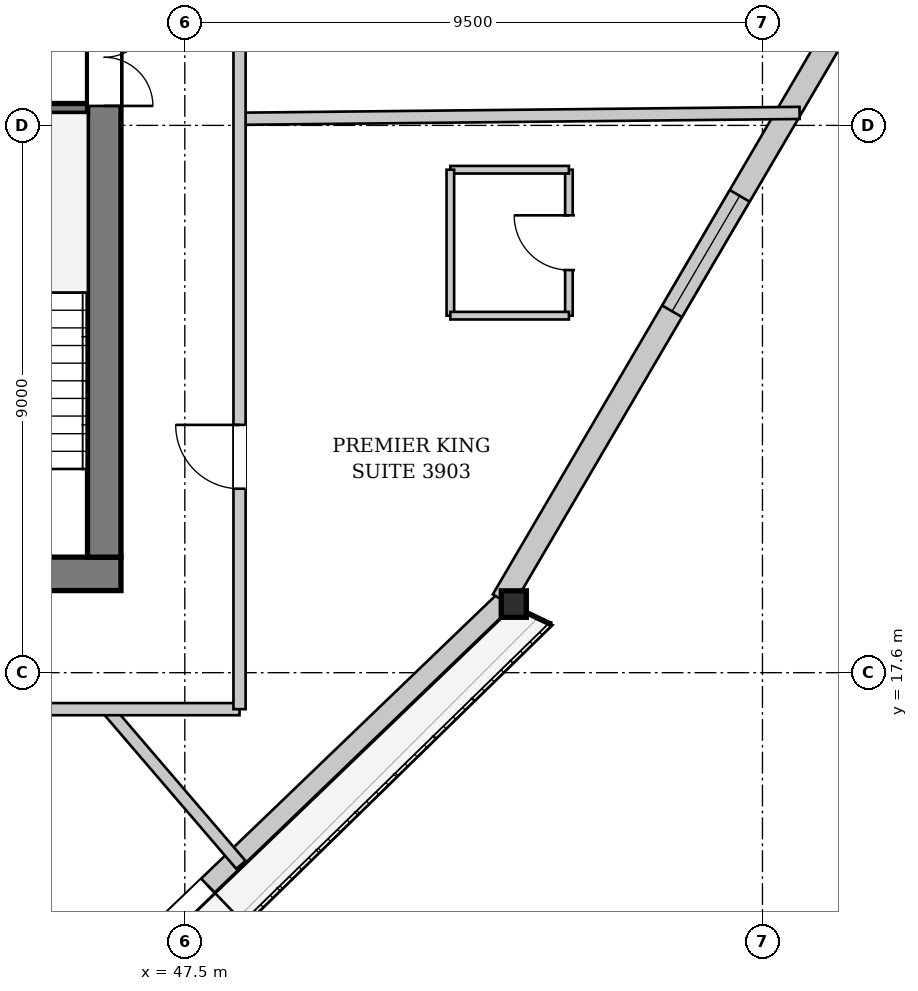
"""IFC4 building model, lengths in metres.
Left out: names, types, materials, properties, quantities, classifications, styles, units other than length and angle.
Written with IfcOpenShell. Run it as: python <this file> out.ifc"""

import sys

from ifc_helpers import new_model, si_unit, direction, frame, frame_2d, origin, origin_2d, place, context, subcontext, project, spatial, rectangle, i_section, extrude, source, transform, mapped, element, fill, save


model = new_model("IFC4")
c1 = context("Model", 3, precision=1e-05, world=origin(), true_north=direction((0.0, 1.0)))
c2 = subcontext(c1, "Body", "Model", "MODEL_VIEW")
j1 = project(units=[si_unit("LENGTHUNIT", "METRE"), si_unit("PLANEANGLEUNIT", "RADIAN")], contexts=[c1])
p1 = place(None, origin())
s1 = spatial("IfcSite", under=j1, at=p1, CompositionType="ELEMENT")
p2 = place(p1, origin())
s2 = spatial("IfcBuilding", under=s1, at=p2, CompositionType="ELEMENT")
p3 = place(p2, frame((0.0, 0.0, 150.15)))
s3 = spatial("IfcBuildingStorey", under=s2, at=p3, CompositionType="ELEMENT", Elevation=150.15)
m1 = source(origin(), c2, "Body", "SweptSolid", [
    extrude(i_section(OverallWidth=0.412, OverallDepth=0.435, WebThickness=0.031, FlangeThickness=0.05, at=origin_2d()), origin(), (0.0, 0.0, 1.0), 3.386),
])
p4 = place(p3, frame((52.893, 18.696, 0.0), z_axis=(0.010167095003, 0.019180477098, 0.999764341971), x_axis=(-0.883545410781, 0.468345499699, 0.0)))
e1 = element("IfcColumn", 1, at=p4, inside=s3, PredefinedType="COLUMN", context=c2, shape_type="MappedRepresentation", body=[
    mapped(m1, transform((0.0, 0.0, 0.0), x_axis=(1.0, 0.0, 0.0), y_axis=(0.0, 1.0, 0.0), z_axis=(0.0, 0.0, 1.0), scale=1.0)),
])
p5 = place(p3, frame((52.782, 18.811, 0.0), z_axis=(0.0, 0.0, 1.0), x_axis=(-0.720961083524, -0.69297555227, 0.0)))
e2 = element("IfcWall", 2, at=p5, inside=s3, PredefinedType="SOLIDWALL", context=c2, shape_type="SweptSolid", body=[
    extrude(rectangle(XDim=23.598, YDim=0.32, at=frame_2d((11.799, 0.0))), origin(), (0.0, 0.0, 1.0), 2.692),
])
p6 = place(p5, frame((6.801, 0.0, 0.0)))
e3 = element("IfcOpeningElement", 3, at=p6, cuts=e2, PredefinedType="OPENING", context=c2, shape_type="SweptSolid", body=[
    extrude(rectangle(XDim=1.5, YDim=2.3, at=frame_2d((0.75, 1.15))), frame((0.0, 0.17, 0.0), z_axis=(0.0, -1.0, 0.0), x_axis=(1.0, 0.0, 0.0)), (0.0, 0.0, 1.0), 0.34),
])
p7 = place(p5, frame((16.163, 0.0, 0.25)))
e4 = element("IfcOpeningElement", 4, at=p7, cuts=e2, PredefinedType="OPENING", context=c2, shape_type="SweptSolid", body=[
    extrude(rectangle(XDim=2.6, YDim=2.35, at=frame_2d((1.3, 1.175))), frame((0.0, 0.17, 0.0), z_axis=(0.0, -1.0, 0.0), x_axis=(1.0, 0.0, 0.0)), (0.0, 0.0, 1.0), 0.34),
])
p8 = place(p3, frame((64.659, 39.152, 0.0), z_axis=(0.0, 0.0, 1.0), x_axis=(-0.505535489227, -0.862805811949, 0.0)))
e5 = element("IfcWall", 5, at=p8, inside=s3, PredefinedType="SOLIDWALL", context=c2, shape_type="SweptSolid", body=[
    extrude(rectangle(XDim=23.598, YDim=0.38, at=frame_2d((11.799, 0.0))), origin(), (0.0, 0.0, 1.0), 2.692),
])
p9 = place(p8, frame((5.507, 0.0, 0.322)))
e6 = element("IfcOpeningElement", 6, at=p9, cuts=e5, PredefinedType="OPENING", context=c2, shape_type="SweptSolid", body=[
    extrude(rectangle(XDim=2.2, YDim=2.25, at=frame_2d((1.1, 1.125))), frame((0.0, 0.2, 0.0), z_axis=(0.0, -1.0, 0.0), x_axis=(1.0, 0.0, 0.0)), (0.0, 0.0, 1.0), 0.4),
])
p10 = place(p8, frame((15.891, 0.0, 0.322)))
e7 = element("IfcOpeningElement", 7, at=p10, cuts=e5, PredefinedType="OPENING", context=c2, shape_type="SweptSolid", body=[
    extrude(rectangle(XDim=2.2, YDim=2.25, at=frame_2d((1.1, 1.125))), frame((0.0, 0.2, 0.0), z_axis=(0.0, -1.0, 0.0), x_axis=(1.0, 0.0, 0.0)), (0.0, 0.0, 1.0), 0.4),
])
p11 = place(p3, frame((46.45, 19.225, 0.0), z_axis=(0.0, 0.0, 1.0), x_axis=(-1.0, 0.0, 0.0)))
e8 = element("IfcWall", 8, at=p11, inside=s3, PredefinedType="SHEAR", context=c2, shape_type="SweptSolid", body=[
    extrude(rectangle(XDim=16.9, YDim=0.55, at=frame_2d((8.45, 0.0))), origin(), (0.0, 0.0, 1.0), 3.3),
])
p12 = place(p11, frame((4.65, 0.0, 0.0)))
e9 = element("IfcOpeningElement", 9, at=p12, cuts=e8, PredefinedType="OPENING", context=c2, shape_type="SweptSolid", body=[
    extrude(rectangle(XDim=1.12, YDim=2.25, at=frame_2d((0.56, 1.125))), frame((0.0, 0.285, 0.0), z_axis=(0.0, -1.0, 0.0), x_axis=(1.0, 0.0, 0.0)), (0.0, 0.0, 1.0), 0.57),
])
p13 = place(p11, frame((11.15, 0.0, 0.0)))
e10 = element("IfcOpeningElement", 10, at=p13, cuts=e8, PredefinedType="OPENING", context=c2, shape_type="SweptSolid", body=[
    extrude(rectangle(XDim=1.12, YDim=2.25, at=frame_2d((0.56, 1.125))), frame((0.0, 0.285, 0.0), z_axis=(0.0, -1.0, 0.0), x_axis=(1.0, 0.0, 0.0)), (0.0, 0.0, 1.0), 0.57),
])
p14 = place(p3, frame((46.175, 33.7, 0.0), z_axis=(0.0, 0.0, 1.0), x_axis=(0.0, -1.0, 0.0)))
e11 = element("IfcWall", 11, at=p14, inside=s3, PredefinedType="SHEAR", context=c2, shape_type="SweptSolid", body=[
    extrude(rectangle(XDim=14.2, YDim=0.55, at=frame_2d((7.1, 0.0))), origin(), (0.0, 0.0, 1.0), 3.3),
])
p15 = place(p14, frame((5.18, 0.0, 0.0)))
e12 = element("IfcOpeningElement", 12, at=p15, cuts=e11, PredefinedType="OPENING", context=c2, shape_type="SweptSolid", body=[
    extrude(rectangle(XDim=1.6, YDim=2.2, at=frame_2d((0.8, 1.1))), frame((0.0, 0.285, 0.0), z_axis=(0.0, -1.0, 0.0), x_axis=(1.0, 0.0, 0.0)), (0.0, 0.0, 1.0), 0.57),
])
p16 = place(p14, frame((2.05, 0.0, 0.0)))
e13 = element("IfcOpeningElement", 13, at=p16, cuts=e11, PredefinedType="OPENING", context=c2, shape_type="SweptSolid", body=[
    extrude(rectangle(XDim=0.95, YDim=2.1, at=frame_2d((0.475, 1.05))), frame((0.0, 0.285, 0.0), z_axis=(0.0, -1.0, 0.0), x_axis=(1.0, 0.0, 0.0)), (0.0, 0.0, 1.0), 0.57),
])
p17 = place(p3, frame((42.88, 26.88, 0.0), z_axis=(0.0, 0.0, 1.0), x_axis=(1.0, 0.0, 0.0)))
e14 = element("IfcWall", 14, at=p17, inside=s3, PredefinedType="PARTITIONING", context=c2, shape_type="SweptSolid", body=[
    extrude(rectangle(XDim=3.02, YDim=0.16, at=frame_2d((1.51, 0.0))), origin(), (0.0, 0.0, 1.0), 3.3),
])
p18 = place(p3, frame((46.228, 17.0, 0.0), z_axis=(0.0, 0.0, 1.0), x_axis=(0.650755597275, -0.759287266201, 0.0)))
e15 = element("IfcWall", 15, at=p18, inside=s3, PredefinedType="PARTITIONING", context=c2, shape_type="SweptSolid", body=[
    extrude(rectangle(XDim=3.372, YDim=0.2, at=frame_2d((1.686, 0.0))), origin(), (0.0, 0.0, 1.0), 3.3),
])
p19 = place(p3, frame((48.4, 26.709, 0.0), z_axis=(0.0, 0.0, 1.0), x_axis=(0.99994519162, 0.010469658874, 0.0)))
e16 = element("IfcWall", 16, at=p19, inside=s3, PredefinedType="PARTITIONING", context=c2, shape_type="SweptSolid", body=[
    extrude(rectangle(XDim=9.211, YDim=0.2, at=frame_2d((4.605, 0.0))), origin(), (0.0, 0.0, 1.0), 3.3),
])
p20 = place(p3, frame((53.817, 23.471, 0.0), z_axis=(0.0, 0.0, 1.0), x_axis=(0.0, 1.0, 0.0)))
e17 = element("IfcWall", 17, at=p20, inside=s3, PredefinedType="PARTITIONING", context=c2, shape_type="SweptSolid", body=[
    extrude(rectangle(XDim=2.4, YDim=0.125, at=frame_2d((1.2, 0.0))), origin(), (0.0, 0.0, 1.0), 3.3),
])
p21 = place(p20, frame((0.75, 0.0, 0.0)))
e18 = element("IfcOpeningElement", 18, at=p21, cuts=e17, PredefinedType="OPENING", context=c2, shape_type="SweptSolid", body=[
    extrude(rectangle(XDim=0.9, YDim=2.1, at=frame_2d((0.45, 1.05))), frame((0.0, 0.073, 0.0), z_axis=(0.0, -1.0, 0.0), x_axis=(1.0, 0.0, 0.0)), (0.0, 0.0, 1.0), 0.145),
])
p22 = place(p3, frame((53.817, 25.871, 0.0), z_axis=(0.0, 0.0, 1.0), x_axis=(-1.0, 0.0, 0.0)))
e19 = element("IfcWall", 19, at=p22, inside=s3, PredefinedType="PARTITIONING", context=c2, shape_type="SweptSolid", body=[
    extrude(rectangle(XDim=1.95, YDim=0.125, at=frame_2d((0.975, 0.0))), origin(), (0.0, 0.0, 1.0), 3.3),
])
p23 = place(p3, frame((51.867, 25.871, 0.0), z_axis=(0.0, 0.0, 1.0), x_axis=(0.0, -1.0, 0.0)))
e20 = element("IfcWall", 20, at=p23, inside=s3, PredefinedType="PARTITIONING", context=c2, shape_type="SweptSolid", body=[
    extrude(rectangle(XDim=2.4, YDim=0.125, at=frame_2d((1.2, 0.0))), origin(), (0.0, 0.0, 1.0), 3.3),
])
p24 = place(p3, frame((51.867, 23.471, 0.0), z_axis=(0.0, 0.0, 1.0), x_axis=(1.0, 0.0, 0.0)))
e21 = element("IfcWall", 21, at=p24, inside=s3, PredefinedType="PARTITIONING", context=c2, shape_type="SweptSolid", body=[
    extrude(rectangle(XDim=1.95, YDim=0.125, at=frame_2d((0.975, 0.0))), origin(), (0.0, 0.0, 1.0), 3.3),
])
p25 = place(p3, frame((27.6, 17.0, 0.0), z_axis=(0.0, 0.0, 1.0), x_axis=(1.0, 0.0, 0.0)))
e22 = element("IfcWall", 22, at=p25, inside=s3, PredefinedType="PARTITIONING", context=c2, shape_type="SweptSolid", body=[
    extrude(rectangle(XDim=20.8, YDim=0.2, at=frame_2d((10.4, 0.0))), origin(), (0.0, 0.0, 1.0), 3.3),
])
p26 = place(p25, frame((11.809, 0.0, 0.0)))
e23 = element("IfcOpeningElement", 23, at=p26, cuts=e22, PredefinedType="OPENING", context=c2, shape_type="SweptSolid", body=[
    extrude(rectangle(XDim=1.05, YDim=2.2, at=frame_2d((0.525, 1.1))), frame((0.0, 0.11, 0.0), z_axis=(0.0, -1.0, 0.0), x_axis=(1.0, 0.0, 0.0)), (0.0, 0.0, 1.0), 0.22),
])
p27 = place(p3, frame((48.4, 17.0, 0.0), z_axis=(0.0, 0.0, 1.0), x_axis=(0.0, 1.0, 0.0)))
e24 = element("IfcWall", 24, at=p27, inside=s3, PredefinedType="PARTITIONING", context=c2, shape_type="SweptSolid", body=[
    extrude(rectangle(XDim=19.2, YDim=0.2, at=frame_2d((9.6, 0.0))), origin(), (0.0, 0.0, 1.0), 3.3),
])
p28 = place(p27, frame((3.625, 0.0, 0.0)))
e25 = element("IfcOpeningElement", 25, at=p28, cuts=e24, PredefinedType="OPENING", context=c2, shape_type="SweptSolid", body=[
    extrude(rectangle(XDim=1.05, YDim=2.2, at=frame_2d((0.525, 1.1))), frame((0.0, 0.11, 0.0), z_axis=(0.0, -1.0, 0.0), x_axis=(1.0, 0.0, 0.0)), (0.0, 0.0, 1.0), 0.22),
])
p29 = place(p27, frame((13.976, 0.0, 0.0)))
e26 = element("IfcOpeningElement", 26, at=p29, cuts=e24, PredefinedType="OPENING", context=c2, shape_type="SweptSolid", body=[
    extrude(rectangle(XDim=1.05, YDim=2.2, at=frame_2d((0.525, 1.1))), frame((0.0, 0.11, 0.0), z_axis=(0.0, -1.0, 0.0), x_axis=(1.0, 0.0, 0.0)), (0.0, 0.0, 1.0), 0.22),
])
m2 = source(origin(), c2, "Body", "SweptSolid", [
    extrude(rectangle(XDim=1.5, YDim=2.3, at=frame_2d((0.75, 1.15))), frame((0.0, 0.025, 0.0), z_axis=(0.0, -1.0, 0.0), x_axis=(1.0, 0.0, 0.0)), (0.0, 0.0, 1.0), 0.05),
])
p30 = place(p6, origin())
e27 = element("IfcDoor", 27, at=p30, inside=s3, OperationType="DOUBLE_DOOR_SINGLE_SWING", PredefinedType="DOOR", context=c2, shape_type="MappedRepresentation", body=[
    mapped(m2, transform((0.0, 0.0, 0.0), x_axis=(1.0, 0.0, 0.0), y_axis=(0.0, 1.0, 0.0), z_axis=(0.0, 0.0, 1.0), scale=1.0)),
])
fill(e3, e27)
m3 = source(origin(), c2, "Body", "SweptSolid", [
    extrude(rectangle(XDim=2.2, YDim=2.25, at=frame_2d((1.1, 1.125))), frame((0.0, 0.03, 0.0), z_axis=(0.0, -1.0, 0.0), x_axis=(1.0, 0.0, 0.0)), (0.0, 0.0, 1.0), 0.06),
])
p31 = place(p10, origin())
e28 = element("IfcWindow", 28, at=p31, inside=s3, PartitioningType="SINGLE_PANEL", PredefinedType="WINDOW", context=c2, shape_type="MappedRepresentation", body=[
    mapped(m3, transform((0.0, 0.0, 0.0), x_axis=(1.0, 0.0, 0.0), y_axis=(0.0, 1.0, 0.0), z_axis=(0.0, 0.0, 1.0), scale=1.0)),
])
fill(e7, e28)
m4 = source(origin(), c2, "Body", "SweptSolid", [
    extrude(rectangle(XDim=1.6, YDim=2.2, at=frame_2d((0.8, 1.1))), frame((0.0, 0.025, 0.0), z_axis=(0.0, -1.0, 0.0), x_axis=(1.0, 0.0, 0.0)), (0.0, 0.0, 1.0), 0.05),
])
p32 = place(p15, origin())
e29 = element("IfcDoor", 29, at=p32, inside=s3, OperationType="DOUBLE_DOOR_SINGLE_SWING", PredefinedType="DOOR", context=c2, shape_type="MappedRepresentation", body=[
    mapped(m4, transform((0.0, 0.0, 0.0), x_axis=(1.0, 0.0, 0.0), y_axis=(0.0, 1.0, 0.0), z_axis=(0.0, 0.0, 1.0), scale=1.0)),
])
fill(e12, e29)
m5 = source(origin(), c2, "Body", "SweptSolid", [
    extrude(rectangle(XDim=0.9, YDim=2.1, at=frame_2d((0.45, 1.05))), frame((0.0, 0.025, 0.0), z_axis=(0.0, -1.0, 0.0), x_axis=(1.0, 0.0, 0.0)), (0.0, 0.0, 1.0), 0.05),
])
p33 = place(p21, origin())
e30 = element("IfcDoor", 30, at=p33, inside=s3, OperationType="SINGLE_SWING_RIGHT", PredefinedType="DOOR", context=c2, shape_type="MappedRepresentation", body=[
    mapped(m5, transform((0.0, 0.0, 0.0), x_axis=(1.0, 0.0, 0.0), y_axis=(0.0, 1.0, 0.0), z_axis=(0.0, 0.0, 1.0), scale=1.0)),
])
fill(e18, e30)
m6 = source(origin(), c2, "Body", "SweptSolid", [
    extrude(rectangle(XDim=1.05, YDim=2.2, at=frame_2d((0.525, 1.1))), frame((0.0, 0.025, 0.0), z_axis=(0.0, -1.0, 0.0), x_axis=(1.0, 0.0, 0.0)), (0.0, 0.0, 1.0), 0.05),
])
p34 = place(p28, origin())
e31 = element("IfcDoor", 31, at=p34, inside=s3, OperationType="SINGLE_SWING_RIGHT", PredefinedType="DOOR", context=c2, shape_type="MappedRepresentation", body=[
    mapped(m6, transform((0.0, 0.0, 0.0), x_axis=(1.0, 0.0, 0.0), y_axis=(0.0, 1.0, 0.0), z_axis=(0.0, 0.0, 1.0), scale=1.0)),
])
fill(e25, e31)
save(model, sys.argv[1])
